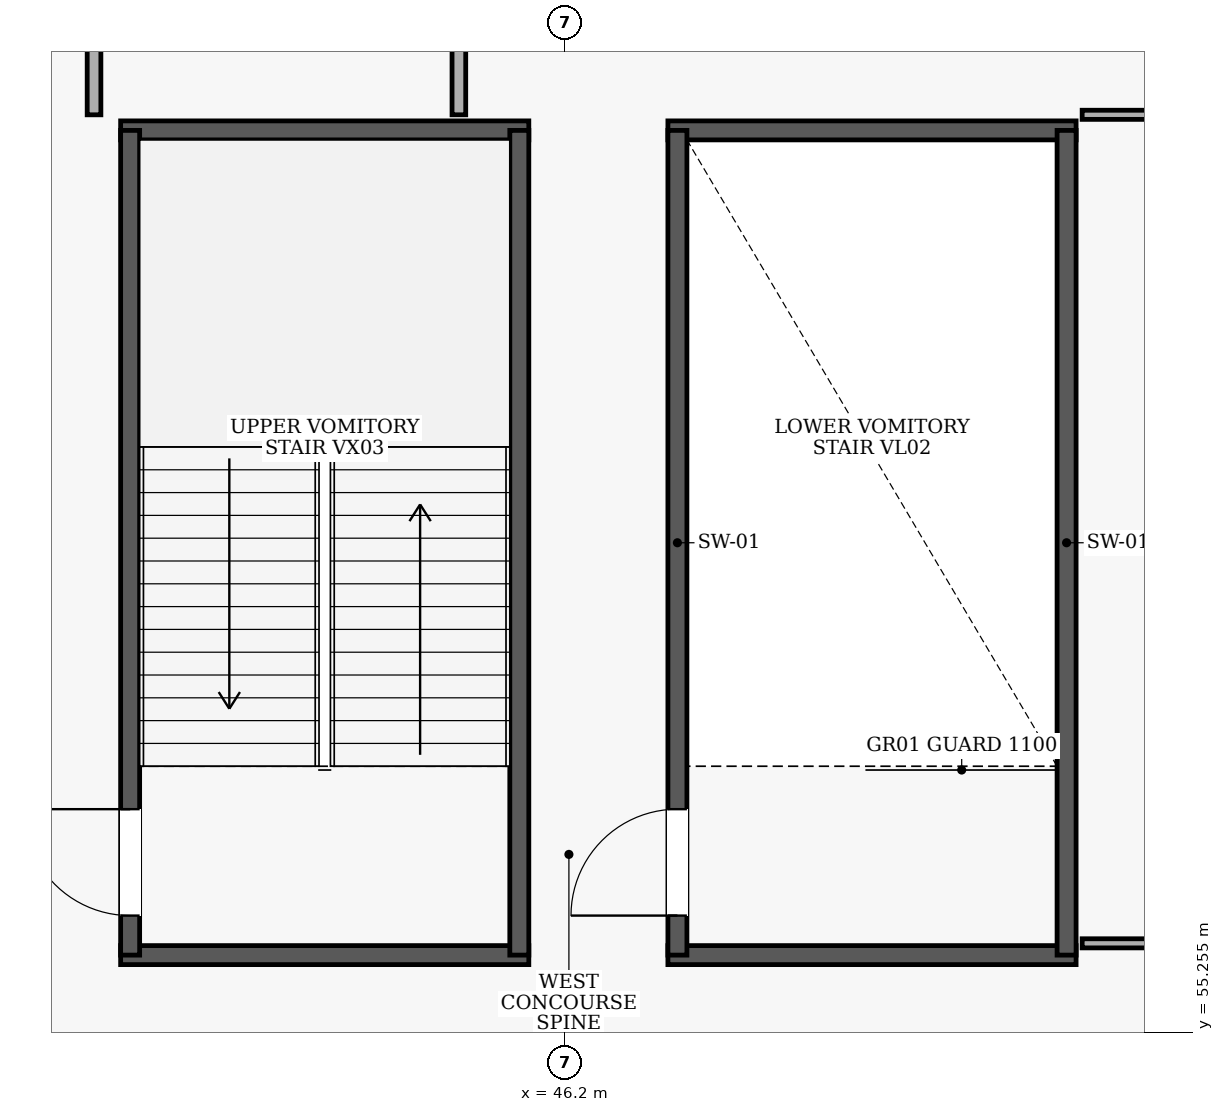
"""IFC4 building model, lengths in metres.
Left out: names, types, materials, properties, quantities, classifications, styles, units other than length and angle.
Written with IfcOpenShell. Run it as: python <this file> out.ifc"""

import sys

from ifc_helpers import new_model, si_unit, direction, frame, frame_2d, origin, place, context, subcontext, project, spatial, rectangle, extrude, element, fill, save


model = new_model("IFC4")
c1 = context("Model", 3, precision=1e-05, world=origin(), true_north=direction((0.0, 1.0)))
c2 = subcontext(c1, "Body", "Model", "MODEL_VIEW")
j1 = project(units=[si_unit("LENGTHUNIT", "METRE"), si_unit("PLANEANGLEUNIT", "RADIAN")], contexts=[c1])
p1 = place(None, origin())
s1 = spatial("IfcSite", under=j1, at=p1, CompositionType="ELEMENT")
p2 = place(p1, origin())
s2 = spatial("IfcBuilding", under=s1, at=p2, CompositionType="ELEMENT")
p3 = place(p2, frame((0.0, 0.0, 5.4)))
s3 = spatial("IfcBuildingStorey", under=s2, at=p3, CompositionType="ELEMENT", Elevation=5.4)
for number, where, z_axis, x_axis in (
    (1, (40.35, 56.275, 0.0), (0.0, 0.0, 1.0), (1.0, 0.0, 0.0)),
    (2, (45.72, 67.125, 0.0), (0.0, 0.0, 1.0), (-1.0, 0.0, 0.0)),
):
    element("IfcWall", number, at=place(p3, frame(where, z_axis=z_axis, x_axis=x_axis)), inside=s3, PredefinedType="SHEAR", context=c2, shape_type="SweptSolid", body=[
        extrude(rectangle(XDim=5.37, YDim=0.25, at=frame_2d((2.685, 0.0))), origin(), (0.0, 0.0, 1.0), 4.5),
    ])
p4 = place(p3, frame((40.475, 56.275, 0.0), z_axis=(0.0, 0.0, 1.0), x_axis=(0.0, 1.0, 0.0)))
e3 = element("IfcWall", 3, at=p4, inside=s3, PredefinedType="SHEAR", context=c2, shape_type="SweptSolid", body=[
    extrude(rectangle(XDim=10.85, YDim=0.25, at=frame_2d((5.425, 0.0))), origin(), (0.0, 0.0, 1.0), 4.5),
])
p5 = place(p4, frame((0.52, 0.0, 0.0)))
e4 = element("IfcOpeningElement", 4, at=p5, cuts=e3, PredefinedType="OPENING", context=c2, shape_type="SweptSolid", body=[
    extrude(rectangle(XDim=1.4, YDim=2.15, at=frame_2d((0.7, 1.075))), frame((0.0, 0.135, 0.0), z_axis=(0.0, -1.0, 0.0), x_axis=(1.0, 0.0, 0.0)), (0.0, 0.0, 1.0), 0.27),
])
p6 = place(p3, frame((45.595, 56.275, 0.0), z_axis=(0.0, 0.0, 1.0), x_axis=(0.0, 1.0, 0.0)))
e5 = element("IfcWall", 5, at=p6, inside=s3, PredefinedType="SHEAR", context=c2, shape_type="SweptSolid", body=[
    extrude(rectangle(XDim=10.85, YDim=0.25, at=frame_2d((5.425, 0.0))), origin(), (0.0, 0.0, 1.0), 4.5),
])
for number, where, z_axis, x_axis in (
    (6, (47.55, 56.275, 0.0), (0.0, 0.0, 1.0), (1.0, 0.0, 0.0)),
    (7, (52.92, 67.125, 0.0), (0.0, 0.0, 1.0), (-1.0, 0.0, 0.0)),
):
    element("IfcWall", number, at=place(p3, frame(where, z_axis=z_axis, x_axis=x_axis)), inside=s3, PredefinedType="SHEAR", context=c2, shape_type="SweptSolid", body=[
        extrude(rectangle(XDim=5.37, YDim=0.25, at=frame_2d((2.685, 0.0))), origin(), (0.0, 0.0, 1.0), 4.5),
    ])
p7 = place(p3, frame((47.675, 56.275, 0.0), z_axis=(0.0, 0.0, 1.0), x_axis=(0.0, 1.0, 0.0)))
e8 = element("IfcWall", 8, at=p7, inside=s3, PredefinedType="SHEAR", context=c2, shape_type="SweptSolid", body=[
    extrude(rectangle(XDim=10.85, YDim=0.25, at=frame_2d((5.425, 0.0))), origin(), (0.0, 0.0, 1.0), 4.5),
])
p8 = place(p7, frame((0.52, 0.0, 0.0)))
e9 = element("IfcOpeningElement", 9, at=p8, cuts=e8, PredefinedType="OPENING", context=c2, shape_type="SweptSolid", body=[
    extrude(rectangle(XDim=1.4, YDim=2.15, at=frame_2d((0.7, 1.075))), frame((0.0, 0.135, 0.0), z_axis=(0.0, -1.0, 0.0), x_axis=(1.0, 0.0, 0.0)), (0.0, 0.0, 1.0), 0.27),
])
p9 = place(p3, frame((52.795, 56.275, 0.0), z_axis=(0.0, 0.0, 1.0), x_axis=(0.0, 1.0, 0.0)))
e10 = element("IfcWall", 10, at=p9, inside=s3, PredefinedType="SHEAR", context=c2, shape_type="SweptSolid", body=[
    extrude(rectangle(XDim=10.85, YDim=0.25, at=frame_2d((5.425, 0.0))), origin(), (0.0, 0.0, 1.0), 4.5),
])
p10 = place(p3, frame((44.8, 67.33, 0.0), z_axis=(0.0, 0.0, 1.0), x_axis=(0.0, 1.0, 0.0)))
e11 = element("IfcWall", 11, at=p10, inside=s3, PredefinedType="PARTITIONING", context=c2, shape_type="SweptSolid", body=[
    extrude(rectangle(XDim=3.07, YDim=0.18, at=frame_2d((1.535, 0.0))), origin(), (0.0, 0.0, 1.0), 4.5),
])
p11 = place(p3, frame((40.0, 70.4, 0.0), z_axis=(0.0, 0.0, 1.0), x_axis=(0.0, -1.0, 0.0)))
e12 = element("IfcWall", 12, at=p11, inside=s3, PredefinedType="PARTITIONING", context=c2, shape_type="SweptSolid", body=[
    extrude(rectangle(XDim=3.07, YDim=0.18, at=frame_2d((1.535, 0.0))), origin(), (0.0, 0.0, 1.0), 4.5),
])
p12 = place(p11, frame((1.035, 0.0, 0.0)))
e13 = element("IfcOpeningElement", 13, at=p12, cuts=e12, PredefinedType="OPENING", context=c2, shape_type="SweptSolid", body=[
    extrude(rectangle(XDim=1.0, YDim=2.1, at=frame_2d((0.5, 1.05))), frame((0.0, 0.1, 0.0), z_axis=(0.0, -1.0, 0.0), x_axis=(1.0, 0.0, 0.0)), (0.0, 0.0, 1.0), 0.2),
])
p13 = place(p3, frame((53.0, 56.43, 0.0), z_axis=(0.0, 0.0, 1.0), x_axis=(1.0, 0.0, 0.0)))
e14 = element("IfcWall", 14, at=p13, inside=s3, PredefinedType="PARTITIONING", context=c2, shape_type="SweptSolid", body=[
    extrude(rectangle(XDim=15.4, YDim=0.12, at=frame_2d((7.7, 0.0))), origin(), (0.0, 0.0, 1.0), 4.5),
])
p14 = place(p13, frame((5.533, 0.0, 0.0)))
e15 = element("IfcOpeningElement", 15, at=p14, cuts=e14, PredefinedType="OPENING", context=c2, shape_type="SweptSolid", body=[
    extrude(rectangle(XDim=2.36, YDim=2.4, at=frame_2d((1.18, 1.2))), frame((0.0, 0.07, 0.0), z_axis=(0.0, -1.0, 0.0), x_axis=(1.0, 0.0, 0.0)), (0.0, 0.0, 1.0), 0.14),
])
p15 = place(p3, frame((68.4, 67.33, 0.0), z_axis=(0.0, 0.0, 1.0), x_axis=(-1.0, 0.0, 0.0)))
e16 = element("IfcWall", 16, at=p15, inside=s3, PredefinedType="PARTITIONING", context=c2, shape_type="SweptSolid", body=[
    extrude(rectangle(XDim=15.4, YDim=0.12, at=frame_2d((7.7, 0.0))), origin(), (0.0, 0.0, 1.0), 4.5),
])
p16 = place(p5, frame((1.4, 0.0, 0.0), z_axis=(0.0, 0.0, 1.0), x_axis=(-1.0, 0.0, 0.0)))
e17 = element("IfcDoor", 17, at=p16, inside=s3, OperationType="SINGLE_SWING_LEFT", PredefinedType="DOOR", context=c2, shape_type="SweptSolid", body=[
    extrude(rectangle(XDim=1.4, YDim=2.15, at=frame_2d((0.7, 1.075))), frame((0.0, 0.025, 0.0), z_axis=(0.0, -1.0, 0.0), x_axis=(1.0, 0.0, 0.0)), (0.0, 0.0, 1.0), 0.05),
])
fill(e4, e17)
p17 = place(p8, frame((1.4, 0.0, 0.0), z_axis=(0.0, 0.0, 1.0), x_axis=(-1.0, 0.0, 0.0)))
e18 = element("IfcDoor", 18, at=p17, inside=s3, OperationType="SINGLE_SWING_RIGHT", PredefinedType="DOOR", context=c2, shape_type="SweptSolid", body=[
    extrude(rectangle(XDim=1.4, YDim=2.15, at=frame_2d((0.7, 1.075))), frame((0.0, 0.025, 0.0), z_axis=(0.0, -1.0, 0.0), x_axis=(1.0, 0.0, 0.0)), (0.0, 0.0, 1.0), 0.05),
])
fill(e9, e18)
save(model, sys.argv[1])
